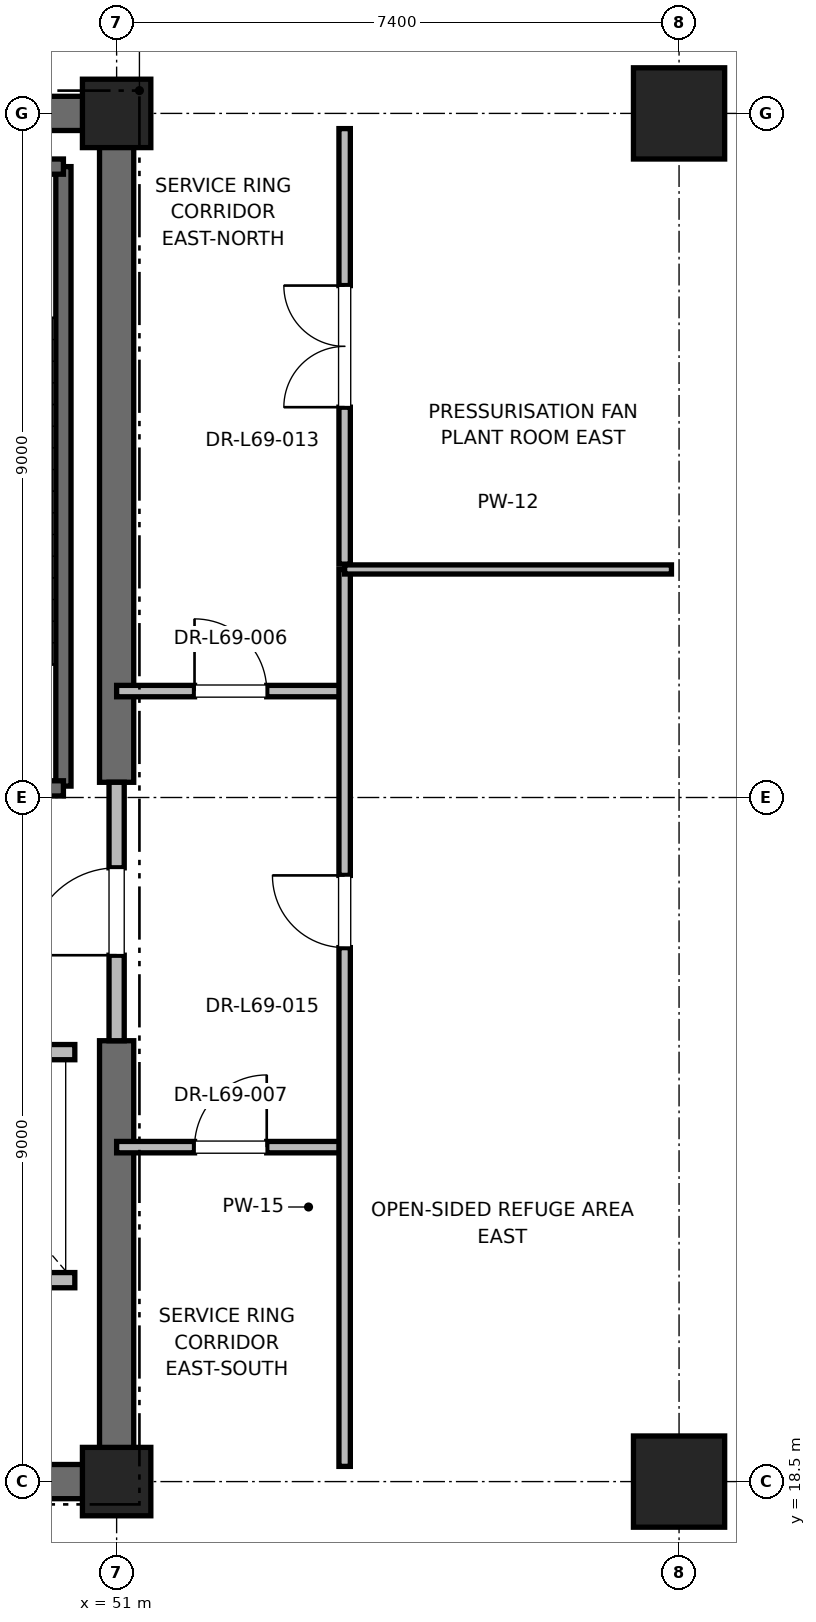
"""IFC4 building model, lengths in metres.
Left out: names, types, materials, properties, quantities, classifications, styles, units other than length and angle.
Written with IfcOpenShell. Run it as: python <this file> out.ifc"""

import sys

from ifc_helpers import new_model, si_unit, direction, frame, frame_2d, origin, origin_2d, place, context, subcontext, project, spatial, rectangle, extrude, element, fill, save


model = new_model("IFC4")
c1 = context("Model", 3, precision=1e-05, world=origin(), true_north=direction((0.0, 1.0)))
c2 = subcontext(c1, "Body", "Model", "MODEL_VIEW")
j1 = project(units=[si_unit("LENGTHUNIT", "METRE"), si_unit("PLANEANGLEUNIT", "RADIAN")], contexts=[c1])
p1 = place(None, origin())
s1 = spatial("IfcSite", under=j1, at=p1, CompositionType="ELEMENT")
p2 = place(p1, origin())
s2 = spatial("IfcBuilding", under=s1, at=p2, CompositionType="ELEMENT")
p3 = place(p2, frame((0.0, 0.0, 295.2)))
s3 = spatial("IfcBuildingStorey", under=s2, at=p3, CompositionType="ELEMENT", Elevation=295.2)
for number, where, z_axis, x_axis in (
    (1, (58.4, 18.5, 0.0), (0.0, 0.0, 1.0), (1.0, 0.0, 0.0)),
    (2, (58.4, 36.5, 0.0), (0.0, 0.0, 1.0), (1.0, 0.0, 0.0)),
):
    element("IfcColumn", number, at=place(p3, frame(where, z_axis=z_axis, x_axis=x_axis)), inside=s3, PredefinedType="COLUMN", context=c2, shape_type="SweptSolid", body=[
        extrude(rectangle(XDim=1.2, YDim=1.2, at=origin_2d()), origin(), (0.0, 0.0, 1.0), 5.8),
    ])
for number, where, z_axis, x_axis in (
    (3, (51.0, 18.5, 0.0), (0.0, 0.0, 1.0), (1.0, 0.0, 0.0)),
    (4, (51.0, 36.5, 0.0), (0.0, 0.0, 1.0), (1.0, 0.0, 0.0)),
):
    element("IfcColumn", number, at=place(p3, frame(where, z_axis=z_axis, x_axis=x_axis)), inside=s3, PredefinedType="PILASTER", context=c2, shape_type="SweptSolid", body=[
        extrude(rectangle(XDim=0.9, YDim=0.9, at=origin_2d()), origin(), (0.0, 0.0, 1.0), 5.8),
    ])
p4 = place(p3, frame((41.8, 18.5, 0.0), z_axis=(0.0, 0.0, 1.0), x_axis=(1.0, 0.0, 0.0)))
e5 = element("IfcWall", 5, at=p4, inside=s3, PredefinedType="SHEAR", context=c2, shape_type="SweptSolid", body=[
    extrude(rectangle(XDim=9.2, YDim=0.45, at=frame_2d((4.6, 0.0))), origin(), (0.0, 0.0, 1.0), 5.5),
])
for number, where, z_axis, x_axis in (
    (6, (45.2, 36.5, 0.0), (0.0, 0.0, 1.0), (1.0, 0.0, 0.0)),
    (7, (51.0, 18.5, 0.0), (0.0, 0.0, 1.0), (0.0, 1.0, 0.0)),
):
    element("IfcWall", number, at=place(p3, frame(where, z_axis=z_axis, x_axis=x_axis)), inside=s3, PredefinedType="SHEAR", context=c2, shape_type="SweptSolid", body=[
        extrude(rectangle(XDim=5.8, YDim=0.45, at=frame_2d((2.9, 0.0))), origin(), (0.0, 0.0, 1.0), 5.5),
    ])
p5 = place(p3, frame((51.0, 27.7, 0.0), z_axis=(0.0, 0.0, 1.0), x_axis=(0.0, 1.0, 0.0)))
e8 = element("IfcWall", 8, at=p5, inside=s3, PredefinedType="SHEAR", context=c2, shape_type="SweptSolid", body=[
    extrude(rectangle(XDim=8.8, YDim=0.45, at=frame_2d((4.4, 0.0))), origin(), (0.0, 0.0, 1.0), 5.5),
])
p6 = place(p3, frame((50.3, 27.65, 0.0), z_axis=(0.0, 0.0, 1.0), x_axis=(0.0, 1.0, 0.0)))
e9 = element("IfcWall", 9, at=p6, inside=s3, PredefinedType="SOLIDWALL", context=c2, shape_type="SweptSolid", body=[
    extrude(rectangle(XDim=8.15, YDim=0.2, at=frame_2d((4.075, 0.0))), origin(), (0.0, 0.0, 1.0), 5.5),
])
p7 = place(p3, frame((47.18, 35.8, 0.0), z_axis=(0.0, 0.0, 1.0), x_axis=(1.0, 0.0, 0.0)))
e10 = element("IfcWall", 10, at=p7, inside=s3, PredefinedType="SOLIDWALL", context=c2, shape_type="SweptSolid", body=[
    extrude(rectangle(XDim=3.12, YDim=0.2, at=frame_2d((1.56, 0.0))), origin(), (0.0, 0.0, 1.0), 5.5),
])
p8 = place(p3, frame((47.18, 27.62, 0.0), z_axis=(0.0, 0.0, 1.0), x_axis=(1.0, 0.0, 0.0)))
e11 = element("IfcWall", 11, at=p8, inside=s3, PredefinedType="SOLIDWALL", context=c2, shape_type="SweptSolid", body=[
    extrude(rectangle(XDim=3.12, YDim=0.2, at=frame_2d((1.56, 0.0))), origin(), (0.0, 0.0, 1.0), 5.5),
])
p9 = place(p8, frame((1.01, 0.0, 0.0)))
e12 = element("IfcOpeningElement", 12, at=p9, cuts=e11, PredefinedType="OPENING", context=c2, shape_type="SweptSolid", body=[
    extrude(rectangle(XDim=1.1, YDim=2.15, at=frame_2d((0.55, 1.075))), frame((0.0, 0.1, 0.0), z_axis=(0.0, -1.0, 0.0), x_axis=(1.0, 0.0, 0.0)), (0.0, 0.0, 1.0), 0.2),
])
p10 = place(p3, frame((51.0, 24.3, 0.0), z_axis=(0.0, 0.0, 1.0), x_axis=(0.0, 1.0, 0.0)))
e13 = element("IfcWall", 13, at=p10, inside=s3, PredefinedType="PARTITIONING", context=c2, shape_type="SweptSolid", body=[
    extrude(rectangle(XDim=3.4, YDim=0.2, at=frame_2d((1.7, 0.0))), origin(), (0.0, 0.0, 1.0), 4.58),
])
p11 = place(p10, frame((1.125, 0.0, 0.0)))
e14 = element("IfcOpeningElement", 14, at=p11, cuts=e13, PredefinedType="OPENING", context=c2, shape_type="SweptSolid", body=[
    extrude(rectangle(XDim=1.15, YDim=2.2, at=frame_2d((0.575, 1.1))), frame((0.0, 0.1, 0.0), z_axis=(0.0, -1.0, 0.0), x_axis=(1.0, 0.0, 0.0)), (0.0, 0.0, 1.0), 0.2),
])
p12 = place(p3, frame((47.85, 21.15, 0.0), z_axis=(0.0, 0.0, 1.0), x_axis=(1.0, 0.0, 0.0)))
e15 = element("IfcWall", 15, at=p12, inside=s3, PredefinedType="SOLIDWALL", context=c2, shape_type="SweptSolid", body=[
    extrude(rectangle(XDim=2.6, YDim=0.2, at=frame_2d((1.3, 0.0))), origin(), (0.0, 0.0, 1.0), 5.5),
])
p13 = place(p3, frame((50.45, 24.15, 0.0), z_axis=(0.0, 0.0, 1.0), x_axis=(-1.0, 0.0, 0.0)))
e16 = element("IfcWall", 16, at=p13, inside=s3, PredefinedType="SOLIDWALL", context=c2, shape_type="SweptSolid", body=[
    extrude(rectangle(XDim=2.6, YDim=0.2, at=frame_2d((1.3, 0.0))), origin(), (0.0, 0.0, 1.0), 4.58),
])
p14 = place(p13, frame((0.75, 0.0, 0.0)))
e17 = element("IfcOpeningElement", 17, at=p14, cuts=e16, PredefinedType="OPENING", context=c2, shape_type="SweptSolid", body=[
    extrude(rectangle(XDim=1.1, YDim=2.2, at=frame_2d((0.55, 1.1))), frame((0.0, 0.1, 0.0), z_axis=(0.0, -1.0, 0.0), x_axis=(1.0, 0.0, 0.0)), (0.0, 0.0, 1.0), 0.2),
])
p15 = place(p3, frame((51.0, 22.9, 0.0), z_axis=(0.0, 0.0, 1.0), x_axis=(1.0, 0.0, 0.0)))
e18 = element("IfcWall", 18, at=p15, inside=s3, PredefinedType="PARTITIONING", context=c2, shape_type="SweptSolid", body=[
    extrude(rectangle(XDim=3.0, YDim=0.15, at=frame_2d((1.5, 0.0))), origin(), (0.0, 0.0, 1.0), 2.85),
])
p16 = place(p15, frame((1.025, 0.0, 0.0)))
e19 = element("IfcOpeningElement", 19, at=p16, cuts=e18, PredefinedType="OPENING", context=c2, shape_type="SweptSolid", body=[
    extrude(rectangle(XDim=0.95, YDim=2.15, at=frame_2d((0.475, 1.075))), frame((0.0, 0.075, 0.0), z_axis=(0.0, -1.0, 0.0), x_axis=(1.0, 0.0, 0.0)), (0.0, 0.0, 1.0), 0.15),
])
p17 = place(p3, frame((51.0, 28.9, 0.0), z_axis=(0.0, 0.0, 1.0), x_axis=(1.0, 0.0, 0.0)))
e20 = element("IfcWall", 20, at=p17, inside=s3, PredefinedType="PARTITIONING", context=c2, shape_type="SweptSolid", body=[
    extrude(rectangle(XDim=3.0, YDim=0.15, at=frame_2d((1.5, 0.0))), origin(), (0.0, 0.0, 1.0), 2.85),
])
p18 = place(p17, frame((1.025, 0.0, 0.0)))
e21 = element("IfcOpeningElement", 21, at=p18, cuts=e20, PredefinedType="OPENING", context=c2, shape_type="SweptSolid", body=[
    extrude(rectangle(XDim=0.95, YDim=2.15, at=frame_2d((0.475, 1.075))), frame((0.0, 0.075, 0.0), z_axis=(0.0, -1.0, 0.0), x_axis=(1.0, 0.0, 0.0)), (0.0, 0.0, 1.0), 0.15),
])
p19 = place(p3, frame((54.0, 18.7, 0.0), z_axis=(0.0, 0.0, 1.0), x_axis=(0.0, 1.0, 0.0)))
e22 = element("IfcWall", 22, at=p19, inside=s3, PredefinedType="PARTITIONING", context=c2, shape_type="SweptSolid", body=[
    extrude(rectangle(XDim=11.8, YDim=0.15, at=frame_2d((5.9, 0.0))), origin(), (0.0, 0.0, 1.0), 2.85),
])
p20 = place(p19, frame((6.825, 0.0, 0.0)))
e23 = element("IfcOpeningElement", 23, at=p20, cuts=e22, PredefinedType="OPENING", context=c2, shape_type="SweptSolid", body=[
    extrude(rectangle(XDim=0.95, YDim=2.15, at=frame_2d((0.475, 1.075))), frame((0.0, 0.075, 0.0), z_axis=(0.0, -1.0, 0.0), x_axis=(1.0, 0.0, 0.0)), (0.0, 0.0, 1.0), 0.15),
])
p21 = place(p3, frame((54.0, 30.5, 0.0), z_axis=(0.0, 0.0, 1.0), x_axis=(1.0, 0.0, 0.0)))
e24 = element("IfcWall", 24, at=p21, inside=s3, PredefinedType="PARTITIONING", context=c2, shape_type="SweptSolid", body=[
    extrude(rectangle(XDim=4.3, YDim=0.12, at=frame_2d((2.15, 0.0))), origin(), (0.0, 0.0, 1.0), 2.85),
])
p22 = place(p3, frame((54.0, 30.57, 0.0), z_axis=(0.0, 0.0, 1.0), x_axis=(0.0, 1.0, 0.0)))
e25 = element("IfcWall", 25, at=p22, inside=s3, PredefinedType="PARTITIONING", context=c2, shape_type="SweptSolid", body=[
    extrude(rectangle(XDim=5.73, YDim=0.15, at=frame_2d((2.865, 0.0))), origin(), (0.0, 0.0, 1.0), 2.85),
])
p23 = place(p22, frame((2.065, 0.0, 0.0)))
e26 = element("IfcOpeningElement", 26, at=p23, cuts=e25, PredefinedType="OPENING", context=c2, shape_type="SweptSolid", body=[
    extrude(rectangle(XDim=1.6, YDim=2.25, at=frame_2d((0.8, 1.125))), frame((0.0, 0.075, 0.0), z_axis=(0.0, -1.0, 0.0), x_axis=(1.0, 0.0, 0.0)), (0.0, 0.0, 1.0), 0.15),
])
p24 = place(p11, origin())
e27 = element("IfcDoor", 27, at=p24, inside=s3, OperationType="SINGLE_SWING_LEFT", PredefinedType="DOOR", context=c2, shape_type="SweptSolid", body=[
    extrude(rectangle(XDim=1.15, YDim=2.2, at=frame_2d((0.575, 1.1))), frame((0.0, 0.025, 0.0), z_axis=(0.0, -1.0, 0.0), x_axis=(1.0, 0.0, 0.0)), (0.0, 0.0, 1.0), 0.05),
])
fill(e14, e27)
p25 = place(p16, origin())
e28 = element("IfcDoor", 28, at=p25, inside=s3, OperationType="SINGLE_SWING_RIGHT", PredefinedType="DOOR", context=c2, shape_type="SweptSolid", body=[
    extrude(rectangle(XDim=0.95, YDim=2.15, at=frame_2d((0.475, 1.075))), frame((0.0, 0.025, 0.0), z_axis=(0.0, -1.0, 0.0), x_axis=(1.0, 0.0, 0.0)), (0.0, 0.0, 1.0), 0.05),
])
fill(e19, e28)
p26 = place(p18, origin())
e29 = element("IfcDoor", 29, at=p26, inside=s3, OperationType="SINGLE_SWING_LEFT", PredefinedType="DOOR", context=c2, shape_type="SweptSolid", body=[
    extrude(rectangle(XDim=0.95, YDim=2.15, at=frame_2d((0.475, 1.075))), frame((0.0, 0.025, 0.0), z_axis=(0.0, -1.0, 0.0), x_axis=(1.0, 0.0, 0.0)), (0.0, 0.0, 1.0), 0.05),
])
fill(e21, e29)
p27 = place(p20, origin())
e30 = element("IfcDoor", 30, at=p27, inside=s3, OperationType="SINGLE_SWING_RIGHT", PredefinedType="DOOR", context=c2, shape_type="SweptSolid", body=[
    extrude(rectangle(XDim=0.95, YDim=2.15, at=frame_2d((0.475, 1.075))), frame((0.0, 0.025, 0.0), z_axis=(0.0, -1.0, 0.0), x_axis=(1.0, 0.0, 0.0)), (0.0, 0.0, 1.0), 0.05),
])
fill(e23, e30)
p28 = place(p23, origin())
e31 = element("IfcDoor", 31, at=p28, inside=s3, OperationType="DOUBLE_DOOR_SINGLE_SWING", PredefinedType="DOOR", context=c2, shape_type="SweptSolid", body=[
    extrude(rectangle(XDim=1.6, YDim=2.25, at=frame_2d((0.8, 1.125))), frame((0.0, 0.025, 0.0), z_axis=(0.0, -1.0, 0.0), x_axis=(1.0, 0.0, 0.0)), (0.0, 0.0, 1.0), 0.05),
])
fill(e26, e31)
save(model, sys.argv[1])
